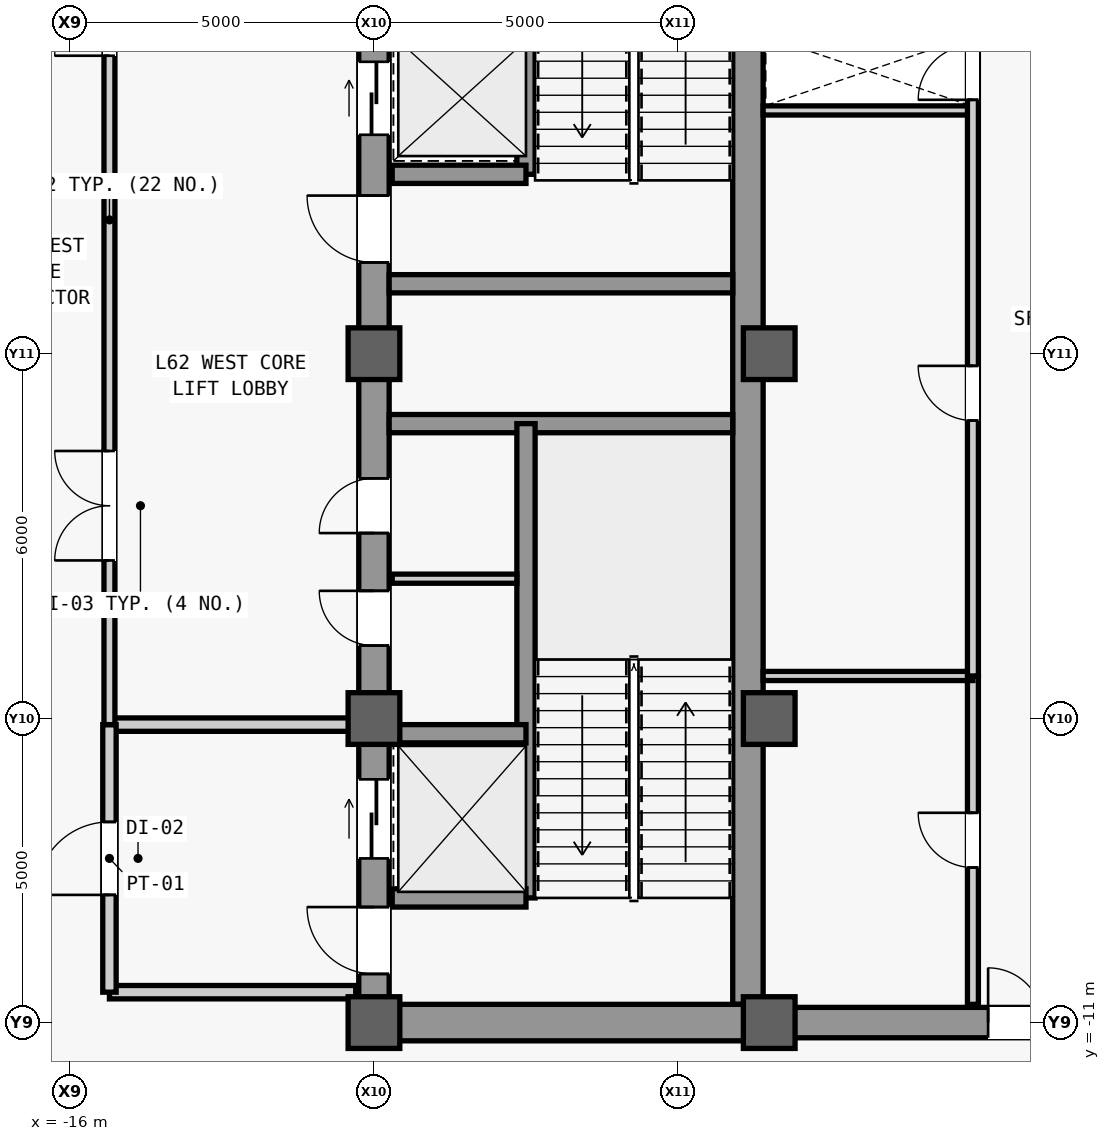
"""IFC4 building model, lengths in metres.
Left out: names, types, materials, properties, quantities, classifications, styles, units other than length and angle.
Written with IfcOpenShell. Run it as: python <this file> out.ifc"""

import sys

from ifc_helpers import new_model, si_unit, direction, frame, frame_2d, origin, origin_2d, place, context, subcontext, project, spatial, rectangle, extrude, source, transform, mapped, element, fill, save


model = new_model("IFC4")
c1 = context("Model", 3, precision=1e-05, world=origin(), true_north=direction((0.0, 1.0)))
c2 = subcontext(c1, "Body", "Model", "MODEL_VIEW")
j1 = project(units=[si_unit("LENGTHUNIT", "METRE"), si_unit("PLANEANGLEUNIT", "RADIAN")], contexts=[c1])
p1 = place(None, origin())
s1 = spatial("IfcSite", under=j1, at=p1, CompositionType="ELEMENT")
p2 = place(p1, origin())
s2 = spatial("IfcBuilding", under=s1, at=p2, CompositionType="ELEMENT")
p3 = place(p2, frame((0.0, 0.0, 263.1)))
s3 = spatial("IfcBuildingStorey", under=s2, at=p3, CompositionType="ELEMENT", Elevation=263.1)
m1 = source(origin(), c2, "Body", "SweptSolid", [
    extrude(rectangle(XDim=22.0, YDim=0.5, at=frame_2d((11.0, 0.0))), origin(), (0.0, 0.0, 1.0), 4.6),
])
p4 = place(p3, frame((-11.0, -11.0, 0.0), z_axis=(0.0, 0.0, 1.0), x_axis=(0.0, 1.0, 0.0)))
e1 = element("IfcWall", 1, at=p4, inside=s3, PredefinedType="SHEAR", context=c2, shape_type="MappedRepresentation", body=[
    mapped(m1, transform((0.0, 0.0, 0.0), scale=1.0)),
])
m2 = source(origin(), c2, "Body", "SweptSolid", [
    extrude(rectangle(XDim=1.1, YDim=2.2, at=frame_2d((0.55, 1.1))), frame((0.0, 0.26, 0.0), z_axis=(0.0, -1.0, 0.0), x_axis=(1.0, 0.0, 0.0)), (0.0, 0.0, 1.0), 0.52),
])
p5 = place(p4, frame((0.8, 0.0, 0.0)))
e2 = element("IfcOpeningElement", 2, at=p5, cuts=e1, PredefinedType="OPENING", context=c2, shape_type="MappedRepresentation", body=[
    mapped(m2, transform((0.0, 0.0, 0.0), scale=1.0)),
])
p6 = place(p4, frame((12.5, 0.0, 0.0)))
e3 = element("IfcOpeningElement", 3, at=p6, cuts=e1, PredefinedType="OPENING", context=c2, shape_type="MappedRepresentation", body=[
    mapped(m2, transform((0.0, 0.0, 0.0), scale=1.0)),
])
m3 = source(origin(), c2, "Body", "SweptSolid", [
    extrude(rectangle(XDim=0.9, YDim=2.15, at=frame_2d((0.45, 1.075))), frame((0.0, 0.26, 0.0), z_axis=(0.0, -1.0, 0.0), x_axis=(1.0, 0.0, 0.0)), (0.0, 0.0, 1.0), 0.52),
])
p7 = place(p4, frame((6.2, 0.0, 0.0)))
e4 = element("IfcOpeningElement", 4, at=p7, cuts=e1, PredefinedType="OPENING", context=c2, shape_type="MappedRepresentation", body=[
    mapped(m3, transform((0.0, 0.0, 0.0), scale=1.0)),
])
p8 = place(p4, frame((8.05, 0.0, 0.0)))
e5 = element("IfcOpeningElement", 5, at=p8, cuts=e1, PredefinedType="OPENING", context=c2, shape_type="MappedRepresentation", body=[
    mapped(m3, transform((0.0, 0.0, 0.0), scale=1.0)),
])
m4 = source(origin(), c2, "Body", "SweptSolid", [
    extrude(rectangle(XDim=1.2, YDim=2.3, at=frame_2d((0.6, 1.15))), frame((0.0, 0.26, 0.0), z_axis=(0.0, -1.0, 0.0), x_axis=(1.0, 0.0, 0.0)), (0.0, 0.0, 1.0), 0.52),
])
p9 = place(p4, frame((14.6, 0.0, 0.0)))
e6 = element("IfcOpeningElement", 6, at=p9, cuts=e1, PredefinedType="OPENING", context=c2, shape_type="MappedRepresentation", body=[
    mapped(m4, transform((0.0, 0.0, 0.0), scale=1.0)),
])
p10 = place(p4, frame((18.2, 0.0, 0.0)))
e7 = element("IfcOpeningElement", 7, at=p10, cuts=e1, PredefinedType="OPENING", context=c2, shape_type="MappedRepresentation", body=[
    mapped(m4, transform((0.0, 0.0, 0.0), scale=1.0)),
])
m5 = source(origin(), c2, "Body", "SweptSolid", [
    extrude(rectangle(XDim=1.3, YDim=2.3, at=frame_2d((0.65, 1.15))), frame((0.0, 0.26, 0.0), z_axis=(0.0, -1.0, 0.0), x_axis=(1.0, 0.0, 0.0)), (0.0, 0.0, 1.0), 0.52),
])
p11 = place(p4, frame((2.7, 0.0, 0.0)))
e8 = element("IfcOpeningElement", 8, at=p11, cuts=e1, PredefinedType="OPENING", context=c2, shape_type="MappedRepresentation", body=[
    mapped(m5, transform((0.0, 0.0, 0.0), scale=1.0)),
])
m6 = source(origin(), c2, "Body", "SweptSolid", [
    extrude(rectangle(XDim=21.4, YDim=0.5, at=frame_2d((10.7, 0.0))), origin(), (0.0, 0.0, 1.0), 4.6),
])
p12 = place(p3, frame((-4.85, -10.7, 0.0), z_axis=(0.0, 0.0, 1.0), x_axis=(0.0, 1.0, 0.0)))
e9 = element("IfcWall", 9, at=p12, inside=s3, PredefinedType="SHEAR", context=c2, shape_type="MappedRepresentation", body=[
    mapped(m6, transform((0.0, 0.0, 0.0), scale=1.0)),
])
m7 = source(origin(), c2, "Body", "SweptSolid", [
    extrude(rectangle(XDim=5.9, YDim=0.6, at=frame_2d((2.95, 0.0))), origin(), (0.0, 0.0, 1.0), 4.6),
])
p13 = place(p3, frame((-10.75, -11.0, 0.0), z_axis=(0.0, 0.0, 1.0), x_axis=(1.0, 0.0, 0.0)))
e10 = element("IfcWall", 10, at=p13, inside=s3, PredefinedType="SHEAR", context=c2, shape_type="MappedRepresentation", body=[
    mapped(m7, transform((0.0, 0.0, 0.0), scale=1.0)),
])
m8 = source(origin(), c2, "Body", "SweptSolid", [
    extrude(rectangle(XDim=5.65, YDim=0.3, at=frame_2d((2.825, 0.0))), origin(), (0.0, 0.0, 1.0), 4.6),
])
for number, where, z_axis, x_axis in (
    (11, (-10.75, -1.15, 0.0), (0.0, 0.0, 1.0), (1.0, 0.0, 0.0)),
    (12, (-10.75, 1.15, 0.0), (0.0, 0.0, 1.0), (1.0, 0.0, 0.0)),
):
    element("IfcWall", number, at=place(p3, frame(where, z_axis=z_axis, x_axis=x_axis)), inside=s3, PredefinedType="SHEAR", context=c2, shape_type="MappedRepresentation", body=[
        mapped(m8, transform((0.0, 0.0, 0.0), scale=1.0)),
    ])
m9 = source(origin(), c2, "Body", "SweptSolid", [
    extrude(rectangle(XDim=9.2, YDim=0.5, at=frame_2d((4.6, 0.0))), origin(), (0.0, 0.0, 1.0), 4.6),
])
p14 = place(p3, frame((-4.6, -11.0, 0.0), z_axis=(0.0, 0.0, 1.0), x_axis=(1.0, 0.0, 0.0)))
e13 = element("IfcWall", 13, at=p14, inside=s3, PredefinedType="SHEAR", context=c2, shape_type="MappedRepresentation", body=[
    mapped(m9, transform((0.0, 0.0, 0.0), scale=1.0)),
])
m10 = source(origin(), c2, "Body", "SweptSolid", [
    extrude(rectangle(XDim=1.8, YDim=2.25, at=frame_2d((0.9, 1.125))), frame((0.0, 0.26, 0.0), z_axis=(0.0, -1.0, 0.0), x_axis=(1.0, 0.0, 0.0)), (0.0, 0.0, 1.0), 0.52),
])
p15 = place(p14, frame((3.7, 0.0, 0.0)))
e14 = element("IfcOpeningElement", 14, at=p15, cuts=e13, PredefinedType="OPENING", context=c2, shape_type="MappedRepresentation", body=[
    mapped(m10, transform((0.0, 0.0, 0.0), scale=1.0)),
])
m11 = source(origin(), c2, "Body", "SweptSolid", [
    extrude(rectangle(XDim=0.85, YDim=0.85, at=origin_2d()), origin(), (0.0, 0.0, 1.0), 5.2),
])
for number, where, z_axis, x_axis in (
    (15, (-11.0, -11.0, 0.0), (0.0, 0.0, 1.0), (1.0, 0.0, 0.0)),
    (16, (-11.0, -6.0, 0.0), (0.0, 0.0, 1.0), (1.0, 0.0, 0.0)),
    (17, (-11.0, 0.0, 0.0), (0.0, 0.0, 1.0), (1.0, 0.0, 0.0)),
    (18, (-4.5, -11.0, 0.0), (0.0, 0.0, 1.0), (1.0, 0.0, 0.0)),
    (19, (-4.5, -6.0, 0.0), (0.0, 0.0, 1.0), (1.0, 0.0, 0.0)),
    (20, (-4.5, 0.0, 0.0), (0.0, 0.0, 1.0), (1.0, 0.0, 0.0)),
):
    element("IfcColumn", number, at=place(p3, frame(where, z_axis=z_axis, x_axis=x_axis)), inside=s3, PredefinedType="COLUMN", context=c2, shape_type="MappedRepresentation", body=[
        mapped(m11, transform((0.0, 0.0, 0.0), scale=1.0)),
    ])
m12 = source(origin(), c2, "Body", "SweptSolid", [
    extrude(rectangle(XDim=7.8, YDim=0.3, at=frame_2d((3.9, 0.0))), origin(), (0.0, 0.0, 1.0), 4.6),
])
p16 = place(p3, frame((-8.5, -8.95, 0.0), z_axis=(0.0, 0.0, 1.0), x_axis=(0.0, 1.0, 0.0)))
e21 = element("IfcWall", 21, at=p16, inside=s3, PredefinedType="SHEAR", context=c2, shape_type="MappedRepresentation", body=[
    mapped(m12, transform((0.0, 0.0, 0.0), scale=1.0)),
])
m13 = source(origin(), c2, "Body", "SweptSolid", [
    extrude(rectangle(XDim=2.2, YDim=0.3, at=frame_2d((1.1, 0.0))), origin(), (0.0, 0.0, 1.0), 4.6),
])
for number, where, z_axis, x_axis in (
    (22, (-10.7, -8.95, 0.0), (0.0, 0.0, 1.0), (1.0, 0.0, 0.0)),
    (23, (-10.7, -6.25, 0.0), (0.0, 0.0, 1.0), (1.0, 0.0, 0.0)),
):
    element("IfcWall", number, at=place(p3, frame(where, z_axis=z_axis, x_axis=x_axis)), inside=s3, PredefinedType="SHEAR", context=c2, shape_type="MappedRepresentation", body=[
        mapped(m13, transform((0.0, 0.0, 0.0), scale=1.0)),
    ])
m14 = source(origin(), c2, "Body", "SweptSolid", [
    extrude(rectangle(XDim=7.75, YDim=0.3, at=frame_2d((3.875, 0.0))), origin(), (0.0, 0.0, 1.0), 4.6),
])
p17 = place(p3, frame((-8.5, 2.95, 0.0), z_axis=(0.0, 0.0, 1.0), x_axis=(0.0, 1.0, 0.0)))
e24 = element("IfcWall", 24, at=p17, inside=s3, PredefinedType="SHEAR", context=c2, shape_type="MappedRepresentation", body=[
    mapped(m14, transform((0.0, 0.0, 0.0), scale=1.0)),
])
p18 = place(p3, frame((-10.7, 2.95, 0.0), z_axis=(0.0, 0.0, 1.0), x_axis=(1.0, 0.0, 0.0)))
e25 = element("IfcWall", 25, at=p18, inside=s3, PredefinedType="SHEAR", context=c2, shape_type="MappedRepresentation", body=[
    mapped(m13, transform((0.0, 0.0, 0.0), scale=1.0)),
])
m15 = source(origin(), c2, "Body", "SweptSolid", [
    extrude(rectangle(XDim=2.05, YDim=0.15, at=frame_2d((1.025, 0.0))), origin(), (0.0, 0.0, 1.0), 4.6),
])
p19 = place(p3, frame((-10.7, -3.7, 0.0), z_axis=(0.0, 0.0, 1.0), x_axis=(1.0, 0.0, 0.0)))
e26 = element("IfcWall", 26, at=p19, inside=s3, PredefinedType="PARTITIONING", context=c2, shape_type="MappedRepresentation", body=[
    mapped(m15, transform((0.0, 0.0, 0.0), scale=1.0)),
])
m16 = source(origin(), c2, "Body", "SweptSolid", [
    extrude(rectangle(XDim=4.05, YDim=0.22, at=frame_2d((2.025, 0.0))), origin(), (0.0, 0.0, 1.0), 4.6),
])
p20 = place(p3, frame((-15.35, -10.5, 0.0), z_axis=(0.0, 0.0, 1.0), x_axis=(1.0, 0.0, 0.0)))
e27 = element("IfcWall", 27, at=p20, inside=s3, PredefinedType="PARTITIONING", context=c2, shape_type="MappedRepresentation", body=[
    mapped(m16, transform((0.0, 0.0, 0.0), scale=1.0)),
])
m17 = source(origin(), c2, "Body", "SweptSolid", [
    extrude(rectangle(XDim=4.05, YDim=0.22, at=frame_2d((2.025, 0.0))), origin(), (0.0, 0.0, 1.0), 2.8),
])
p21 = place(p3, frame((-15.35, -6.1, 0.0), z_axis=(0.0, 0.0, 1.0), x_axis=(1.0, 0.0, 0.0)))
e28 = element("IfcWall", 28, at=p21, inside=s3, PredefinedType="PARTITIONING", context=c2, shape_type="MappedRepresentation", body=[
    mapped(m17, transform((0.0, 0.0, 0.0), scale=1.0)),
])
m18 = source(origin(), c2, "Body", "SweptSolid", [
    extrude(rectangle(XDim=4.4, YDim=0.22, at=frame_2d((2.2, 0.0))), origin(), (0.0, 0.0, 1.0), 4.6),
])
p22 = place(p3, frame((-15.35, -10.5, 0.0), z_axis=(0.0, 0.0, 1.0), x_axis=(0.0, 1.0, 0.0)))
e29 = element("IfcWall", 29, at=p22, inside=s3, PredefinedType="PARTITIONING", context=c2, shape_type="MappedRepresentation", body=[
    mapped(m18, transform((0.0, 0.0, 0.0), scale=1.0)),
])
m19 = source(origin(), c2, "Body", "SweptSolid", [
    extrude(rectangle(XDim=1.2, YDim=2.2, at=frame_2d((0.6, 1.1))), frame((0.0, 0.12, 0.0), z_axis=(0.0, -1.0, 0.0), x_axis=(1.0, 0.0, 0.0)), (0.0, 0.0, 1.0), 0.24),
])
p23 = place(p22, frame((1.6, 0.0, 0.0)))
e30 = element("IfcOpeningElement", 30, at=p23, cuts=e29, PredefinedType="OPENING", context=c2, shape_type="MappedRepresentation", body=[
    mapped(m19, transform((0.0, 0.0, 0.0), scale=1.0)),
])
m20 = source(origin(), c2, "Body", "SweptSolid", [
    extrude(rectangle(XDim=16.6, YDim=0.18, at=frame_2d((8.3, 0.0))), origin(), (0.0, 0.0, 1.0), 4.6),
])
p24 = place(p3, frame((-15.35, -6.1, 0.0), z_axis=(0.0, 0.0, 1.0), x_axis=(0.0, 1.0, 0.0)))
e31 = element("IfcWall", 31, at=p24, inside=s3, PredefinedType="PARTITIONING", context=c2, shape_type="MappedRepresentation", body=[
    mapped(m20, transform((0.0, 0.0, 0.0), scale=1.0)),
])
m21 = source(origin(), c2, "Body", "SweptSolid", [
    extrude(rectangle(XDim=1.8, YDim=2.25, at=frame_2d((0.9, 1.125))), frame((0.0, 0.1, 0.0), z_axis=(0.0, -1.0, 0.0), x_axis=(1.0, 0.0, 0.0)), (0.0, 0.0, 1.0), 0.2),
])
p25 = place(p24, frame((2.7, 0.0, 0.0)))
e32 = element("IfcOpeningElement", 32, at=p25, cuts=e31, PredefinedType="OPENING", context=c2, shape_type="MappedRepresentation", body=[
    mapped(m21, transform((0.0, 0.0, 0.0), scale=1.0)),
])
p26 = place(p24, frame((11.0, 0.0, 0.0)))
e33 = element("IfcOpeningElement", 33, at=p26, cuts=e31, PredefinedType="OPENING", context=c2, shape_type="MappedRepresentation", body=[
    mapped(m21, transform((0.0, 0.0, 0.0), scale=1.0)),
])
m22 = source(origin(), c2, "Body", "SweptSolid", [
    extrude(rectangle(XDim=3.45, YDim=0.15, at=frame_2d((1.725, 0.0))), origin(), (0.0, 0.0, 1.0), 4.6),
])
p27 = place(p3, frame((-4.6, 4.0, 0.0), z_axis=(0.0, 0.0, 1.0), x_axis=(1.0, 0.0, 0.0)))
e34 = element("IfcWall", 34, at=p27, inside=s3, PredefinedType="PARTITIONING", context=c2, shape_type="MappedRepresentation", body=[
    mapped(m22, transform((0.0, 0.0, 0.0), scale=1.0)),
])
m23 = source(origin(), c2, "Body", "SweptSolid", [
    extrude(rectangle(XDim=5.4, YDim=0.18, at=frame_2d((2.7, 0.0))), origin(), (0.0, 0.0, 1.0), 4.6),
])
p28 = place(p3, frame((-1.15, -10.7, 0.0), z_axis=(0.0, 0.0, 1.0), x_axis=(0.0, 1.0, 0.0)))
e35 = element("IfcWall", 35, at=p28, inside=s3, PredefinedType="PARTITIONING", context=c2, shape_type="MappedRepresentation", body=[
    mapped(m23, transform((0.0, 0.0, 0.0), scale=1.0)),
])
m24 = source(origin(), c2, "Body", "SweptSolid", [
    extrude(rectangle(XDim=0.9, YDim=2.15, at=frame_2d((0.45, 1.075))), frame((0.0, 0.1, 0.0), z_axis=(0.0, -1.0, 0.0), x_axis=(1.0, 0.0, 0.0)), (0.0, 0.0, 1.0), 0.2),
])
p29 = place(p28, frame((2.25, 0.0, 0.0)))
e36 = element("IfcOpeningElement", 36, at=p29, cuts=e35, PredefinedType="OPENING", context=c2, shape_type="MappedRepresentation", body=[
    mapped(m24, transform((0.0, 0.0, 0.0), scale=1.0)),
])
p30 = place(p3, frame((-4.6, -5.3, 0.0), z_axis=(0.0, 0.0, 1.0), x_axis=(1.0, 0.0, 0.0)))
e37 = element("IfcWall", 37, at=p30, inside=s3, PredefinedType="PARTITIONING", context=c2, shape_type="MappedRepresentation", body=[
    mapped(m22, transform((0.0, 0.0, 0.0), scale=1.0)),
])
m25 = source(origin(), c2, "Body", "SweptSolid", [
    extrude(rectangle(XDim=10.6, YDim=0.18, at=frame_2d((5.3, 0.0))), origin(), (0.0, 0.0, 1.0), 4.6),
])
p31 = place(p3, frame((-1.15, -5.3, 0.0), z_axis=(0.0, 0.0, 1.0), x_axis=(0.0, 1.0, 0.0)))
e38 = element("IfcWall", 38, at=p31, inside=s3, PredefinedType="PARTITIONING", context=c2, shape_type="MappedRepresentation", body=[
    mapped(m25, transform((0.0, 0.0, 0.0), scale=1.0)),
])
p32 = place(p31, frame((4.2, 0.0, 0.0)))
e39 = element("IfcOpeningElement", 39, at=p32, cuts=e38, PredefinedType="OPENING", context=c2, shape_type="MappedRepresentation", body=[
    mapped(m24, transform((0.0, 0.0, 0.0), scale=1.0)),
])
p33 = place(p31, frame((9.475, 0.0, 0.0)))
e40 = element("IfcOpeningElement", 40, at=p33, cuts=e38, PredefinedType="OPENING", context=c2, shape_type="MappedRepresentation", body=[
    mapped(m24, transform((0.0, 0.0, 0.0), scale=1.0)),
])
m26 = source(origin(), c2, "Body", "SweptSolid", [
    extrude(rectangle(XDim=1.1, YDim=2.2, at=frame_2d((0.55, 1.1))), frame((0.0, 0.025, 0.0), z_axis=(0.0, -1.0, 0.0), x_axis=(1.0, 0.0, 0.0)), (0.0, 0.0, 1.0), 0.05),
])
p34 = place(p5, origin())
e41 = element("IfcDoor", 41, at=p34, inside=s3, OperationType="SINGLE_SWING_RIGHT", PredefinedType="DOOR", context=c2, shape_type="MappedRepresentation", body=[
    mapped(m26, transform((0.0, 0.0, 0.0), scale=1.0)),
])
fill(e2, e41)
p35 = place(p6, origin())
e42 = element("IfcDoor", 42, at=p35, inside=s3, OperationType="SINGLE_SWING_RIGHT", PredefinedType="DOOR", context=c2, shape_type="MappedRepresentation", body=[
    mapped(m26, transform((0.0, 0.0, 0.0), scale=1.0)),
])
fill(e3, e42)
m27 = source(origin(), c2, "Body", "SweptSolid", [
    extrude(rectangle(XDim=0.9, YDim=2.15, at=frame_2d((0.45, 1.075))), frame((0.0, 0.025, 0.0), z_axis=(0.0, -1.0, 0.0), x_axis=(1.0, 0.0, 0.0)), (0.0, 0.0, 1.0), 0.05),
])
p36 = place(p7, origin())
e43 = element("IfcDoor", 43, at=p36, inside=s3, OperationType="SINGLE_SWING_RIGHT", PredefinedType="DOOR", context=c2, shape_type="MappedRepresentation", body=[
    mapped(m27, transform((0.0, 0.0, 0.0), scale=1.0)),
])
fill(e4, e43)
p37 = place(p8, origin())
e44 = element("IfcDoor", 44, at=p37, inside=s3, OperationType="SINGLE_SWING_LEFT", PredefinedType="DOOR", context=c2, shape_type="MappedRepresentation", body=[
    mapped(m27, transform((0.0, 0.0, 0.0), scale=1.0)),
])
fill(e5, e44)
m28 = source(origin(), c2, "Body", "SweptSolid", [
    extrude(rectangle(XDim=1.2, YDim=2.2, at=frame_2d((0.6, 1.1))), frame((0.0, 0.025, 0.0), z_axis=(0.0, -1.0, 0.0), x_axis=(1.0, 0.0, 0.0)), (0.0, 0.0, 1.0), 0.05),
])
p38 = place(p23, origin())
e45 = element("IfcDoor", 45, at=p38, inside=s3, OperationType="SINGLE_SWING_LEFT", PredefinedType="DOOR", context=c2, shape_type="MappedRepresentation", body=[
    mapped(m28, transform((0.0, 0.0, 0.0), scale=1.0)),
])
fill(e30, e45)
m29 = source(origin(), c2, "Body", "SweptSolid", [
    extrude(rectangle(XDim=1.8, YDim=2.25, at=frame_2d((0.9, 1.125))), frame((0.0, 0.025, 0.0), z_axis=(0.0, -1.0, 0.0), x_axis=(1.0, 0.0, 0.0)), (0.0, 0.0, 1.0), 0.05),
])
p39 = place(p25, origin())
e46 = element("IfcDoor", 46, at=p39, inside=s3, OperationType="SINGLE_SWING_LEFT", PredefinedType="DOOR", context=c2, shape_type="MappedRepresentation", body=[
    mapped(m29, transform((0.0, 0.0, 0.0), scale=1.0)),
])
fill(e32, e46)
p40 = place(p26, origin())
e47 = element("IfcDoor", 47, at=p40, inside=s3, OperationType="SINGLE_SWING_RIGHT", PredefinedType="DOOR", context=c2, shape_type="MappedRepresentation", body=[
    mapped(m29, transform((0.0, 0.0, 0.0), scale=1.0)),
])
fill(e33, e47)
p41 = place(p29, origin())
e48 = element("IfcDoor", 48, at=p41, inside=s3, OperationType="SINGLE_SWING_RIGHT", PredefinedType="DOOR", context=c2, shape_type="MappedRepresentation", body=[
    mapped(m27, transform((0.0, 0.0, 0.0), scale=1.0)),
])
fill(e36, e48)
p42 = place(p15, origin())
e49 = element("IfcDoor", 49, at=p42, inside=s3, OperationType="SINGLE_SWING_LEFT", PredefinedType="DOOR", context=c2, shape_type="MappedRepresentation", body=[
    mapped(m29, transform((0.0, 0.0, 0.0), scale=1.0)),
])
fill(e14, e49)
p43 = place(p32, origin())
e50 = element("IfcDoor", 50, at=p43, inside=s3, OperationType="SINGLE_SWING_RIGHT", PredefinedType="DOOR", context=c2, shape_type="MappedRepresentation", body=[
    mapped(m27, transform((0.0, 0.0, 0.0), scale=1.0)),
])
fill(e39, e50)
p44 = place(p33, origin())
e51 = element("IfcDoor", 51, at=p44, inside=s3, OperationType="SINGLE_SWING_LEFT", PredefinedType="DOOR", context=c2, shape_type="MappedRepresentation", body=[
    mapped(m27, transform((0.0, 0.0, 0.0), scale=1.0)),
])
fill(e40, e51)
m30 = source(origin(), c2, "Body", "SweptSolid", [
    extrude(rectangle(XDim=1.2, YDim=2.3, at=frame_2d((0.6, 1.15))), frame((0.0, 0.025, 0.0), z_axis=(0.0, -1.0, 0.0), x_axis=(1.0, 0.0, 0.0)), (0.0, 0.0, 1.0), 0.05),
])
p45 = place(p9, origin())
e52 = element("IfcDoor", 52, at=p45, inside=s3, OperationType="SLIDING_TO_LEFT", PredefinedType="DOOR", context=c2, shape_type="MappedRepresentation", body=[
    mapped(m30, transform((0.0, 0.0, 0.0), scale=1.0)),
])
fill(e6, e52)
m31 = source(origin(), c2, "Body", "SweptSolid", [
    extrude(rectangle(XDim=1.3, YDim=2.3, at=frame_2d((0.65, 1.15))), frame((0.0, 0.025, 0.0), z_axis=(0.0, -1.0, 0.0), x_axis=(1.0, 0.0, 0.0)), (0.0, 0.0, 1.0), 0.05),
])
p46 = place(p11, origin())
e53 = element("IfcDoor", 53, at=p46, inside=s3, OperationType="SLIDING_TO_LEFT", PredefinedType="DOOR", context=c2, shape_type="MappedRepresentation", body=[
    mapped(m31, transform((0.0, 0.0, 0.0), scale=1.0)),
])
fill(e8, e53)
save(model, sys.argv[1])
